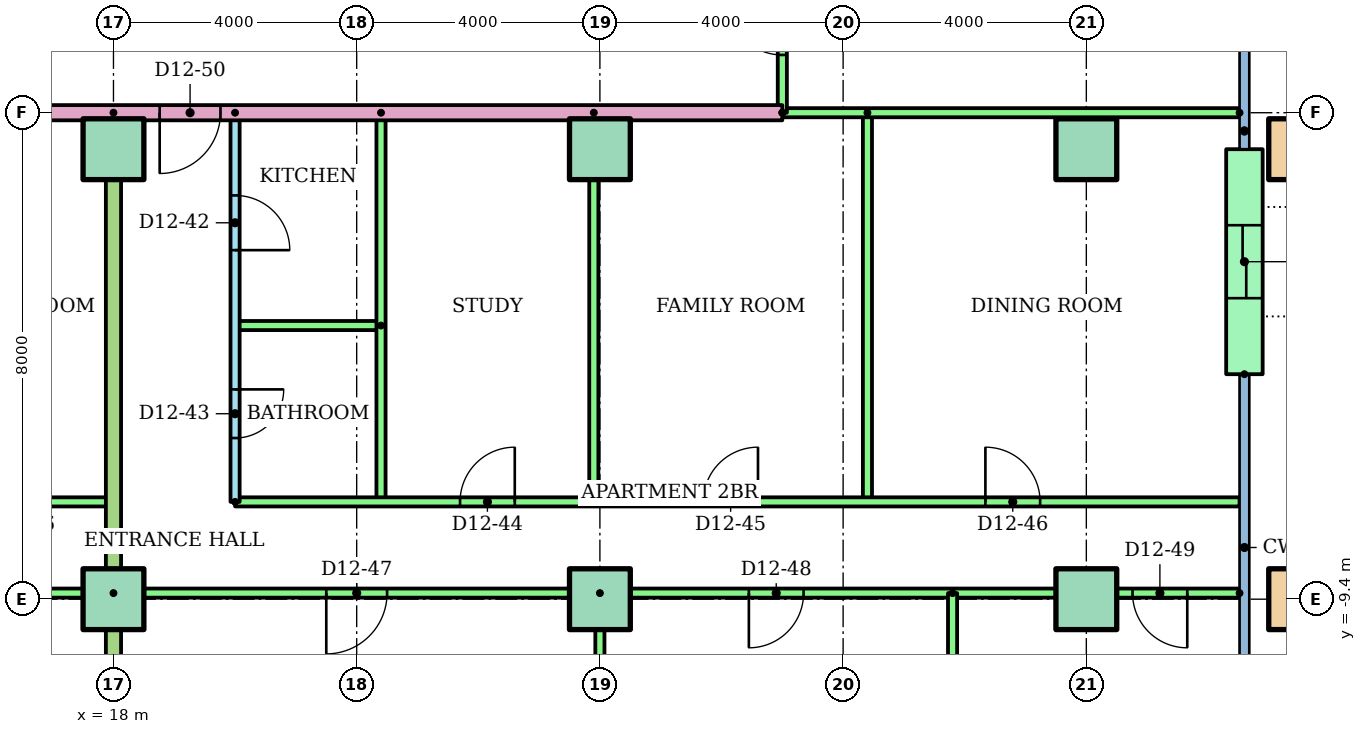
"""IFC4 building model, lengths in metres.
Left out: names, types, materials, properties, quantities, classifications, styles, units other than length and angle.
Written with IfcOpenShell. Run it as: python <this file> out.ifc"""

import sys

from ifc_helpers import new_model, si_unit, direction, frame, frame_2d, origin, origin_2d, place, context, subcontext, project, spatial, rectangle, hollow_rectangle, extrude, element, fill, save


model = new_model("IFC4")
c1 = context("Model", 3, precision=1e-05, world=origin(), true_north=direction((0.0, 1.0)))
c2 = subcontext(c1, "Body", "Model", "MODEL_VIEW")
j1 = project(units=[si_unit("LENGTHUNIT", "METRE"), si_unit("PLANEANGLEUNIT", "RADIAN")], contexts=[c1])
p1 = place(None, origin())
s1 = spatial("IfcSite", under=j1, at=p1, CompositionType="ELEMENT")
p2 = place(p1, origin())
s2 = spatial("IfcBuilding", under=s1, at=p2, CompositionType="ELEMENT")
p3 = place(p2, frame((0.0, 0.0, 48.0)))
s3 = spatial("IfcBuildingStorey", under=s2, at=p3, CompositionType="ELEMENT", Elevation=48.0)
for number, where in (
    (1, (18.0, -9.4, 0.0)),
    (2, (26.0, -9.4, 0.0)),
    (3, (34.0, -9.4, 0.0)),
):
    element("IfcColumn", number, at=place(p3, frame(where)), inside=s3, PredefinedType="COLUMN", context=c2, shape_type="SweptSolid", body=[
        extrude(rectangle(XDim=1.0, YDim=1.0, at=origin_2d()), origin(), (0.0, 0.0, 1.0), 3.2),
    ])
p4 = place(p3, frame((37.5, -9.4, 0.0)))
e4 = element("IfcColumn", 4, at=p4, inside=s3, PredefinedType="COLUMN", context=c2, shape_type="SweptSolid", body=[
    extrude(hollow_rectangle(XDim=1.0, YDim=1.0, WallThickness=0.05, at=origin_2d()), origin(), (0.0, 0.0, 1.0), 3.2),
])
for number, where in (
    (5, (18.0, -2.0, 0.0)),
    (6, (26.0, -2.0, 0.0)),
    (7, (34.0, -2.0, 0.0)),
):
    element("IfcColumn", number, at=place(p3, frame(where)), inside=s3, PredefinedType="COLUMN", context=c2, shape_type="SweptSolid", body=[
        extrude(rectangle(XDim=1.0, YDim=1.0, at=origin_2d()), origin(), (0.0, 0.0, 1.0), 3.2),
    ])
p5 = place(p3, frame((37.5, -2.0, 0.0)))
e8 = element("IfcColumn", 8, at=p5, inside=s3, PredefinedType="COLUMN", context=c2, shape_type="SweptSolid", body=[
    extrude(hollow_rectangle(XDim=1.0, YDim=1.0, WallThickness=0.05, at=origin_2d()), origin(), (0.0, 0.0, 1.0), 3.2),
])
p6 = place(p3, frame((36.6, -5.7, 0.0), z_axis=(0.0, 0.0, 1.0), x_axis=(0.0, 1.0, 0.0)))
e9 = element("IfcWall", 9, at=p6, inside=s3, PredefinedType="STANDARD", context=c2, shape_type="SweptSolid", body=[
    extrude(rectangle(XDim=3.7, YDim=0.6, at=frame_2d((1.85, 0.0))), origin(), (0.0, 0.0, 1.0), 2.92),
])
p7 = place(p6, frame((1.25, 0.0, 0.0)))
e10 = element("IfcOpeningElement", 10, at=p7, cuts=e9, PredefinedType="OPENING", context=c2, shape_type="SweptSolid", body=[
    extrude(rectangle(XDim=1.2, YDim=2.1, at=frame_2d((0.6, 1.05))), frame((0.0, 0.31, 0.0), z_axis=(0.0, -1.0, 0.0), x_axis=(1.0, 0.0, 0.0)), (0.0, 0.0, 1.0), 0.62),
])
p8 = place(p3, frame((4.0, -7.8, 0.0)))
e11 = element("IfcWall", 11, at=p8, inside=s3, PredefinedType="PARTITIONING", context=c2, shape_type="SweptSolid", body=[
    extrude(rectangle(XDim=14.0, YDim=0.15, at=frame_2d((7.0, 0.0))), origin(), (0.0, 0.0, 1.0), 2.4),
])
p9 = place(p8, frame((4.325, 0.0, 0.0)))
e12 = element("IfcOpeningElement", 12, at=p9, cuts=e11, PredefinedType="OPENING", context=c2, shape_type="SweptSolid", body=[
    extrude(rectangle(XDim=0.9, YDim=2.1, at=frame_2d((0.45, 1.05))), frame((0.0, 0.085, 0.0), z_axis=(0.0, -1.0, 0.0), x_axis=(1.0, 0.0, 0.0)), (0.0, 0.0, 1.0), 0.17),
])
p10 = place(p8, frame((8.575, 0.0, 0.0)))
e13 = element("IfcOpeningElement", 13, at=p10, cuts=e11, PredefinedType="OPENING", context=c2, shape_type="SweptSolid", body=[
    extrude(rectangle(XDim=0.9, YDim=2.1, at=frame_2d((0.45, 1.05))), frame((0.0, 0.085, 0.0), z_axis=(0.0, -1.0, 0.0), x_axis=(1.0, 0.0, 0.0)), (0.0, 0.0, 1.0), 0.17),
])
p11 = place(p8, frame((12.0, 0.0, 0.0)))
e14 = element("IfcOpeningElement", 14, at=p11, cuts=e11, PredefinedType="OPENING", context=c2, shape_type="SweptSolid", body=[
    extrude(rectangle(XDim=0.9, YDim=2.1, at=frame_2d((0.45, 1.05))), frame((0.0, 0.085, 0.0), z_axis=(0.0, -1.0, 0.0), x_axis=(1.0, 0.0, 0.0)), (0.0, 0.0, 1.0), 0.17),
])
p12 = place(p3, frame((18.0, -9.3, 0.0), z_axis=(0.0, 0.0, 1.0), x_axis=(-1.0, 0.0, 0.0)))
e15 = element("IfcWall", 15, at=p12, inside=s3, PredefinedType="PARTITIONING", context=c2, shape_type="SweptSolid", body=[
    extrude(rectangle(XDim=16.0, YDim=0.15, at=frame_2d((8.0, 0.0))), origin(), (0.0, 0.0, 1.0), 2.4),
])
p13 = place(p12, frame((13.55, 0.0, 0.0)))
e16 = element("IfcOpeningElement", 16, at=p13, cuts=e15, PredefinedType="OPENING", context=c2, shape_type="SweptSolid", body=[
    extrude(rectangle(XDim=0.9, YDim=2.1, at=frame_2d((0.45, 1.05))), frame((0.0, 0.085, 0.0), z_axis=(0.0, -1.0, 0.0), x_axis=(1.0, 0.0, 0.0)), (0.0, 0.0, 1.0), 0.17),
])
p14 = place(p12, frame((9.55, 0.0, 0.0)))
e17 = element("IfcOpeningElement", 17, at=p14, cuts=e15, PredefinedType="OPENING", context=c2, shape_type="SweptSolid", body=[
    extrude(rectangle(XDim=0.9, YDim=2.1, at=frame_2d((0.45, 1.05))), frame((0.0, 0.085, 0.0), z_axis=(0.0, -1.0, 0.0), x_axis=(1.0, 0.0, 0.0)), (0.0, 0.0, 1.0), 0.17),
])
p15 = place(p12, frame((5.55, 0.0, 0.0)))
e18 = element("IfcOpeningElement", 18, at=p15, cuts=e15, PredefinedType="OPENING", context=c2, shape_type="SweptSolid", body=[
    extrude(rectangle(XDim=0.9, YDim=2.1, at=frame_2d((0.45, 1.05))), frame((0.0, 0.085, 0.0), z_axis=(0.0, -1.0, 0.0), x_axis=(1.0, 0.0, 0.0)), (0.0, 0.0, 1.0), 0.17),
])
p16 = place(p12, frame((1.5, 0.0, 0.0)))
e19 = element("IfcOpeningElement", 19, at=p16, cuts=e15, PredefinedType="OPENING", context=c2, shape_type="SweptSolid", body=[
    extrude(rectangle(XDim=1.0, YDim=2.1, at=frame_2d((0.5, 1.05))), frame((0.0, 0.085, 0.0), z_axis=(0.0, -1.0, 0.0), x_axis=(1.0, 0.0, 0.0)), (0.0, 0.0, 1.0), 0.17),
])
p17 = place(p3, frame((20.0, -1.4, 0.0), z_axis=(0.0, 0.0, 1.0), x_axis=(0.0, -1.0, 0.0)))
e20 = element("IfcWall", 20, at=p17, inside=s3, PredefinedType="PARTITIONING", context=c2, shape_type="SweptSolid", body=[
    extrude(rectangle(XDim=6.4, YDim=0.15, at=frame_2d((3.2, 0.0))), origin(), (0.0, 0.0, 1.0), 2.4),
])
p18 = place(p17, frame((1.36, 0.0, 0.0)))
e21 = element("IfcOpeningElement", 21, at=p18, cuts=e20, PredefinedType="OPENING", context=c2, shape_type="SweptSolid", body=[
    extrude(rectangle(XDim=0.9, YDim=2.1, at=frame_2d((0.45, 1.05))), frame((0.0, 0.085, 0.0), z_axis=(0.0, -1.0, 0.0), x_axis=(1.0, 0.0, 0.0)), (0.0, 0.0, 1.0), 0.17),
])
p19 = place(p17, frame((4.55, 0.0, 0.0)))
e22 = element("IfcOpeningElement", 22, at=p19, cuts=e20, PredefinedType="OPENING", context=c2, shape_type="SweptSolid", body=[
    extrude(rectangle(XDim=0.8, YDim=2.1, at=frame_2d((0.4, 1.05))), frame((0.0, 0.085, 0.0), z_axis=(0.0, -1.0, 0.0), x_axis=(1.0, 0.0, 0.0)), (0.0, 0.0, 1.0), 0.17),
])
p20 = place(p3, frame((22.4, -4.9, 0.0), z_axis=(0.0, 0.0, 1.0), x_axis=(-1.0, 0.0, 0.0)))
e23 = element("IfcWall", 23, at=p20, inside=s3, PredefinedType="PARTITIONING", context=c2, shape_type="SweptSolid", body=[
    extrude(rectangle(XDim=2.4, YDim=0.15, at=frame_2d((1.2, 0.0))), origin(), (0.0, 0.0, 1.0), 2.4),
])
for number, where, z_axis, x_axis in (
    (24, (22.4, -1.4, 0.0), (0.0, 0.0, 1.0), (0.0, -1.0, 0.0)),
    (25, (25.9, -1.4, 0.0), (0.0, 0.0, 1.0), (0.0, -1.0, 0.0)),
    (26, (30.4, -1.4, 0.0), (0.0, 0.0, 1.0), (0.0, -1.0, 0.0)),
):
    element("IfcWall", number, at=place(p3, frame(where, z_axis=z_axis, x_axis=x_axis)), inside=s3, PredefinedType="PARTITIONING", context=c2, shape_type="SweptSolid", body=[
        extrude(rectangle(XDim=6.4, YDim=0.15, at=frame_2d((3.2, 0.0))), origin(), (0.0, 0.0, 1.0), 2.4),
    ])
p21 = place(p3, frame((20.0, -7.8, 0.0)))
e27 = element("IfcWall", 27, at=p21, inside=s3, PredefinedType="PARTITIONING", context=c2, shape_type="SweptSolid", body=[
    extrude(rectangle(XDim=16.52, YDim=0.15, at=frame_2d((8.26, 0.0))), origin(), (0.0, 0.0, 1.0), 2.4),
])
p22 = place(p21, frame((3.7, 0.0, 0.0)))
e28 = element("IfcOpeningElement", 28, at=p22, cuts=e27, PredefinedType="OPENING", context=c2, shape_type="SweptSolid", body=[
    extrude(rectangle(XDim=0.9, YDim=2.1, at=frame_2d((0.45, 1.05))), frame((0.0, 0.085, 0.0), z_axis=(0.0, -1.0, 0.0), x_axis=(1.0, 0.0, 0.0)), (0.0, 0.0, 1.0), 0.17),
])
p23 = place(p21, frame((7.7, 0.0, 0.0)))
e29 = element("IfcOpeningElement", 29, at=p23, cuts=e27, PredefinedType="OPENING", context=c2, shape_type="SweptSolid", body=[
    extrude(rectangle(XDim=0.9, YDim=2.1, at=frame_2d((0.45, 1.05))), frame((0.0, 0.085, 0.0), z_axis=(0.0, -1.0, 0.0), x_axis=(1.0, 0.0, 0.0)), (0.0, 0.0, 1.0), 0.17),
])
p24 = place(p21, frame((12.34, 0.0, 0.0)))
e30 = element("IfcOpeningElement", 30, at=p24, cuts=e27, PredefinedType="OPENING", context=c2, shape_type="SweptSolid", body=[
    extrude(rectangle(XDim=0.9, YDim=2.1, at=frame_2d((0.45, 1.05))), frame((0.0, 0.085, 0.0), z_axis=(0.0, -1.0, 0.0), x_axis=(1.0, 0.0, 0.0)), (0.0, 0.0, 1.0), 0.17),
])
p25 = place(p3, frame((36.52, -9.3, 0.0), z_axis=(0.0, 0.0, 1.0), x_axis=(-1.0, 0.0, 0.0)))
e31 = element("IfcWall", 31, at=p25, inside=s3, PredefinedType="PARTITIONING", context=c2, shape_type="SweptSolid", body=[
    extrude(rectangle(XDim=18.52, YDim=0.15, at=frame_2d((9.26, 0.0))), origin(), (0.0, 0.0, 1.0), 2.4),
])
p26 = place(p25, frame((14.02, 0.0, 0.0)))
e32 = element("IfcOpeningElement", 32, at=p26, cuts=e31, PredefinedType="OPENING", context=c2, shape_type="SweptSolid", body=[
    extrude(rectangle(XDim=1.0, YDim=2.1, at=frame_2d((0.5, 1.05))), frame((0.0, 0.085, 0.0), z_axis=(0.0, -1.0, 0.0), x_axis=(1.0, 0.0, 0.0)), (0.0, 0.0, 1.0), 0.17),
])
p27 = place(p25, frame((7.17, 0.0, 0.0)))
e33 = element("IfcOpeningElement", 33, at=p27, cuts=e31, PredefinedType="OPENING", context=c2, shape_type="SweptSolid", body=[
    extrude(rectangle(XDim=0.9, YDim=2.1, at=frame_2d((0.45, 1.05))), frame((0.0, 0.085, 0.0), z_axis=(0.0, -1.0, 0.0), x_axis=(1.0, 0.0, 0.0)), (0.0, 0.0, 1.0), 0.17),
])
p28 = place(p25, frame((0.86, 0.0, 0.0)))
e34 = element("IfcOpeningElement", 34, at=p28, cuts=e31, PredefinedType="OPENING", context=c2, shape_type="SweptSolid", body=[
    extrude(rectangle(XDim=0.9, YDim=2.1, at=frame_2d((0.45, 1.05))), frame((0.0, 0.085, 0.0), z_axis=(0.0, -1.0, 0.0), x_axis=(1.0, 0.0, 0.0)), (0.0, 0.0, 1.0), 0.17),
])
p29 = place(p3, frame((26.0, -9.3, 0.0), z_axis=(0.0, 0.0, 1.0), x_axis=(0.0, -1.0, 0.0)))
e35 = element("IfcWall", 35, at=p29, inside=s3, PredefinedType="PARTITIONING", context=c2, shape_type="SweptSolid", body=[
    extrude(rectangle(XDim=6.81, YDim=0.15, at=frame_2d((3.405, 0.0))), origin(), (0.0, 0.0, 1.0), 2.4),
])
p30 = place(p3, frame((31.8, -9.3, 0.0), z_axis=(0.0, 0.0, 1.0), x_axis=(0.0, -1.0, 0.0)))
e36 = element("IfcWall", 36, at=p30, inside=s3, PredefinedType="PARTITIONING", context=c2, shape_type="SweptSolid", body=[
    extrude(rectangle(XDim=5.02, YDim=0.15, at=frame_2d((2.51, 0.0))), origin(), (0.0, 0.0, 1.0), 2.4),
])
p31 = place(p3, frame((18.0, -1.4, 0.0), z_axis=(0.0, 0.0, 1.0), x_axis=(0.0, -1.0, 0.0)))
e37 = element("IfcWall", 37, at=p31, inside=s3, PredefinedType="PARTITIONING", context=c2, shape_type="SweptSolid", body=[
    extrude(rectangle(XDim=14.71, YDim=0.25, at=frame_2d((7.355, 0.0))), origin(), (0.0, 0.0, 1.0), 2.4),
])
p32 = place(p3, frame((29.0, -1.4, 0.0), z_axis=(0.0, 0.0, 1.0), x_axis=(-1.0, 0.0, 0.0)))
e38 = element("IfcWall", 38, at=p32, inside=s3, PredefinedType="PARTITIONING", context=c2, shape_type="SweptSolid", body=[
    extrude(rectangle(XDim=15.0, YDim=0.25, at=frame_2d((7.5, 0.0))), origin(), (0.0, 0.0, 1.0), 2.4),
])
p33 = place(p32, frame((9.24, 0.0, 0.0)))
e39 = element("IfcOpeningElement", 39, at=p33, cuts=e38, PredefinedType="OPENING", context=c2, shape_type="SweptSolid", body=[
    extrude(rectangle(XDim=1.0, YDim=2.1, at=frame_2d((0.5, 1.05))), frame((0.0, 0.135, 0.0), z_axis=(0.0, -1.0, 0.0), x_axis=(1.0, 0.0, 0.0)), (0.0, 0.0, 1.0), 0.27),
])
p34 = place(p3, frame((36.52, -1.4, 0.0), z_axis=(0.0, 0.0, 1.0), x_axis=(-1.0, 0.0, 0.0)))
e40 = element("IfcWall", 40, at=p34, inside=s3, PredefinedType="PARTITIONING", context=c2, shape_type="SweptSolid", body=[
    extrude(rectangle(XDim=7.52, YDim=0.15, at=frame_2d((3.76, 0.0))), origin(), (0.0, 0.0, 1.0), 2.4),
])
p35 = place(p3, frame((29.0, -1.4, 0.0), z_axis=(0.0, 0.0, 1.0), x_axis=(0.0, 1.0, 0.0)))
e41 = element("IfcWall", 41, at=p35, inside=s3, PredefinedType="PARTITIONING", context=c2, shape_type="SweptSolid", body=[
    extrude(rectangle(XDim=2.8, YDim=0.15, at=frame_2d((1.4, 0.0))), origin(), (0.0, 0.0, 1.0), 2.4),
])
p36 = place(p35, frame((0.95, 0.0, 0.0)))
e42 = element("IfcOpeningElement", 42, at=p36, cuts=e41, PredefinedType="OPENING", context=c2, shape_type="SweptSolid", body=[
    extrude(rectangle(XDim=0.9, YDim=2.1, at=frame_2d((0.45, 1.05))), frame((0.0, 0.085, 0.0), z_axis=(0.0, -1.0, 0.0), x_axis=(1.0, 0.0, 0.0)), (0.0, 0.0, 1.0), 0.17),
])
p37 = place(p18, origin())
e43 = element("IfcDoor", 43, at=p37, inside=s3, OperationType="SINGLE_SWING_RIGHT", PredefinedType="DOOR", context=c2, shape_type="SweptSolid", body=[
    extrude(rectangle(XDim=0.9, YDim=2.1, at=frame_2d((0.45, 1.05))), frame((0.0, 0.025, 0.0), z_axis=(0.0, -1.0, 0.0), x_axis=(1.0, 0.0, 0.0)), (0.0, 0.0, 1.0), 0.05),
])
fill(e21, e43)
p38 = place(p19, origin())
e44 = element("IfcDoor", 44, at=p38, inside=s3, OperationType="SINGLE_SWING_LEFT", PredefinedType="DOOR", context=c2, shape_type="SweptSolid", body=[
    extrude(rectangle(XDim=0.8, YDim=2.1, at=frame_2d((0.4, 1.05))), frame((0.0, 0.025, 0.0), z_axis=(0.0, -1.0, 0.0), x_axis=(1.0, 0.0, 0.0)), (0.0, 0.0, 1.0), 0.05),
])
fill(e22, e44)
p39 = place(p22, origin())
e45 = element("IfcDoor", 45, at=p39, inside=s3, OperationType="SINGLE_SWING_RIGHT", PredefinedType="DOOR", context=c2, shape_type="SweptSolid", body=[
    extrude(rectangle(XDim=0.9, YDim=2.1, at=frame_2d((0.45, 1.05))), frame((0.0, 0.025, 0.0), z_axis=(0.0, -1.0, 0.0), x_axis=(1.0, 0.0, 0.0)), (0.0, 0.0, 1.0), 0.05),
])
fill(e28, e45)
p40 = place(p23, origin())
e46 = element("IfcDoor", 46, at=p40, inside=s3, OperationType="SINGLE_SWING_RIGHT", PredefinedType="DOOR", context=c2, shape_type="SweptSolid", body=[
    extrude(rectangle(XDim=0.9, YDim=2.1, at=frame_2d((0.45, 1.05))), frame((0.0, 0.025, 0.0), z_axis=(0.0, -1.0, 0.0), x_axis=(1.0, 0.0, 0.0)), (0.0, 0.0, 1.0), 0.05),
])
fill(e29, e46)
p41 = place(p24, origin())
e47 = element("IfcDoor", 47, at=p41, inside=s3, OperationType="SINGLE_SWING_LEFT", PredefinedType="DOOR", context=c2, shape_type="SweptSolid", body=[
    extrude(rectangle(XDim=0.9, YDim=2.1, at=frame_2d((0.45, 1.05))), frame((0.0, 0.025, 0.0), z_axis=(0.0, -1.0, 0.0), x_axis=(1.0, 0.0, 0.0)), (0.0, 0.0, 1.0), 0.05),
])
fill(e30, e47)
p42 = place(p26, origin())
e48 = element("IfcDoor", 48, at=p42, inside=s3, OperationType="SINGLE_SWING_RIGHT", PredefinedType="DOOR", context=c2, shape_type="SweptSolid", body=[
    extrude(rectangle(XDim=1.0, YDim=2.1, at=frame_2d((0.5, 1.05))), frame((0.0, 0.025, 0.0), z_axis=(0.0, -1.0, 0.0), x_axis=(1.0, 0.0, 0.0)), (0.0, 0.0, 1.0), 0.05),
])
fill(e32, e48)
p43 = place(p27, origin())
e49 = element("IfcDoor", 49, at=p43, inside=s3, OperationType="SINGLE_SWING_RIGHT", PredefinedType="DOOR", context=c2, shape_type="SweptSolid", body=[
    extrude(rectangle(XDim=0.9, YDim=2.1, at=frame_2d((0.45, 1.05))), frame((0.0, 0.025, 0.0), z_axis=(0.0, -1.0, 0.0), x_axis=(1.0, 0.0, 0.0)), (0.0, 0.0, 1.0), 0.05),
])
fill(e33, e49)
p44 = place(p28, origin())
e50 = element("IfcDoor", 50, at=p44, inside=s3, OperationType="SINGLE_SWING_LEFT", PredefinedType="DOOR", context=c2, shape_type="SweptSolid", body=[
    extrude(rectangle(XDim=0.9, YDim=2.1, at=frame_2d((0.45, 1.05))), frame((0.0, 0.025, 0.0), z_axis=(0.0, -1.0, 0.0), x_axis=(1.0, 0.0, 0.0)), (0.0, 0.0, 1.0), 0.05),
])
fill(e34, e50)
p45 = place(p33, origin())
e51 = element("IfcDoor", 51, at=p45, inside=s3, OperationType="SINGLE_SWING_RIGHT", PredefinedType="DOOR", context=c2, shape_type="SweptSolid", body=[
    extrude(rectangle(XDim=1.0, YDim=2.1, at=frame_2d((0.5, 1.05))), frame((0.0, 0.025, 0.0), z_axis=(0.0, -1.0, 0.0), x_axis=(1.0, 0.0, 0.0)), (0.0, 0.0, 1.0), 0.05),
])
fill(e39, e51)
p46 = place(p36, origin())
e52 = element("IfcDoor", 52, at=p46, inside=s3, OperationType="SINGLE_SWING_RIGHT", PredefinedType="DOOR", context=c2, shape_type="SweptSolid", body=[
    extrude(rectangle(XDim=0.9, YDim=2.1, at=frame_2d((0.45, 1.05))), frame((0.0, 0.025, 0.0), z_axis=(0.0, -1.0, 0.0), x_axis=(1.0, 0.0, 0.0)), (0.0, 0.0, 1.0), 0.05),
])
fill(e42, e52)
p47 = place(p7, origin())
e53 = element("IfcDoor", 53, at=p47, inside=s3, OperationType="SLIDING_TO_LEFT", PredefinedType="DOOR", context=c2, shape_type="SweptSolid", body=[
    extrude(rectangle(XDim=1.2, YDim=2.1, at=frame_2d((0.6, 1.05))), frame((0.0, 0.025, 0.0), z_axis=(0.0, -1.0, 0.0), x_axis=(1.0, 0.0, 0.0)), (0.0, 0.0, 1.0), 0.05),
])
fill(e10, e53)
save(model, sys.argv[1])
